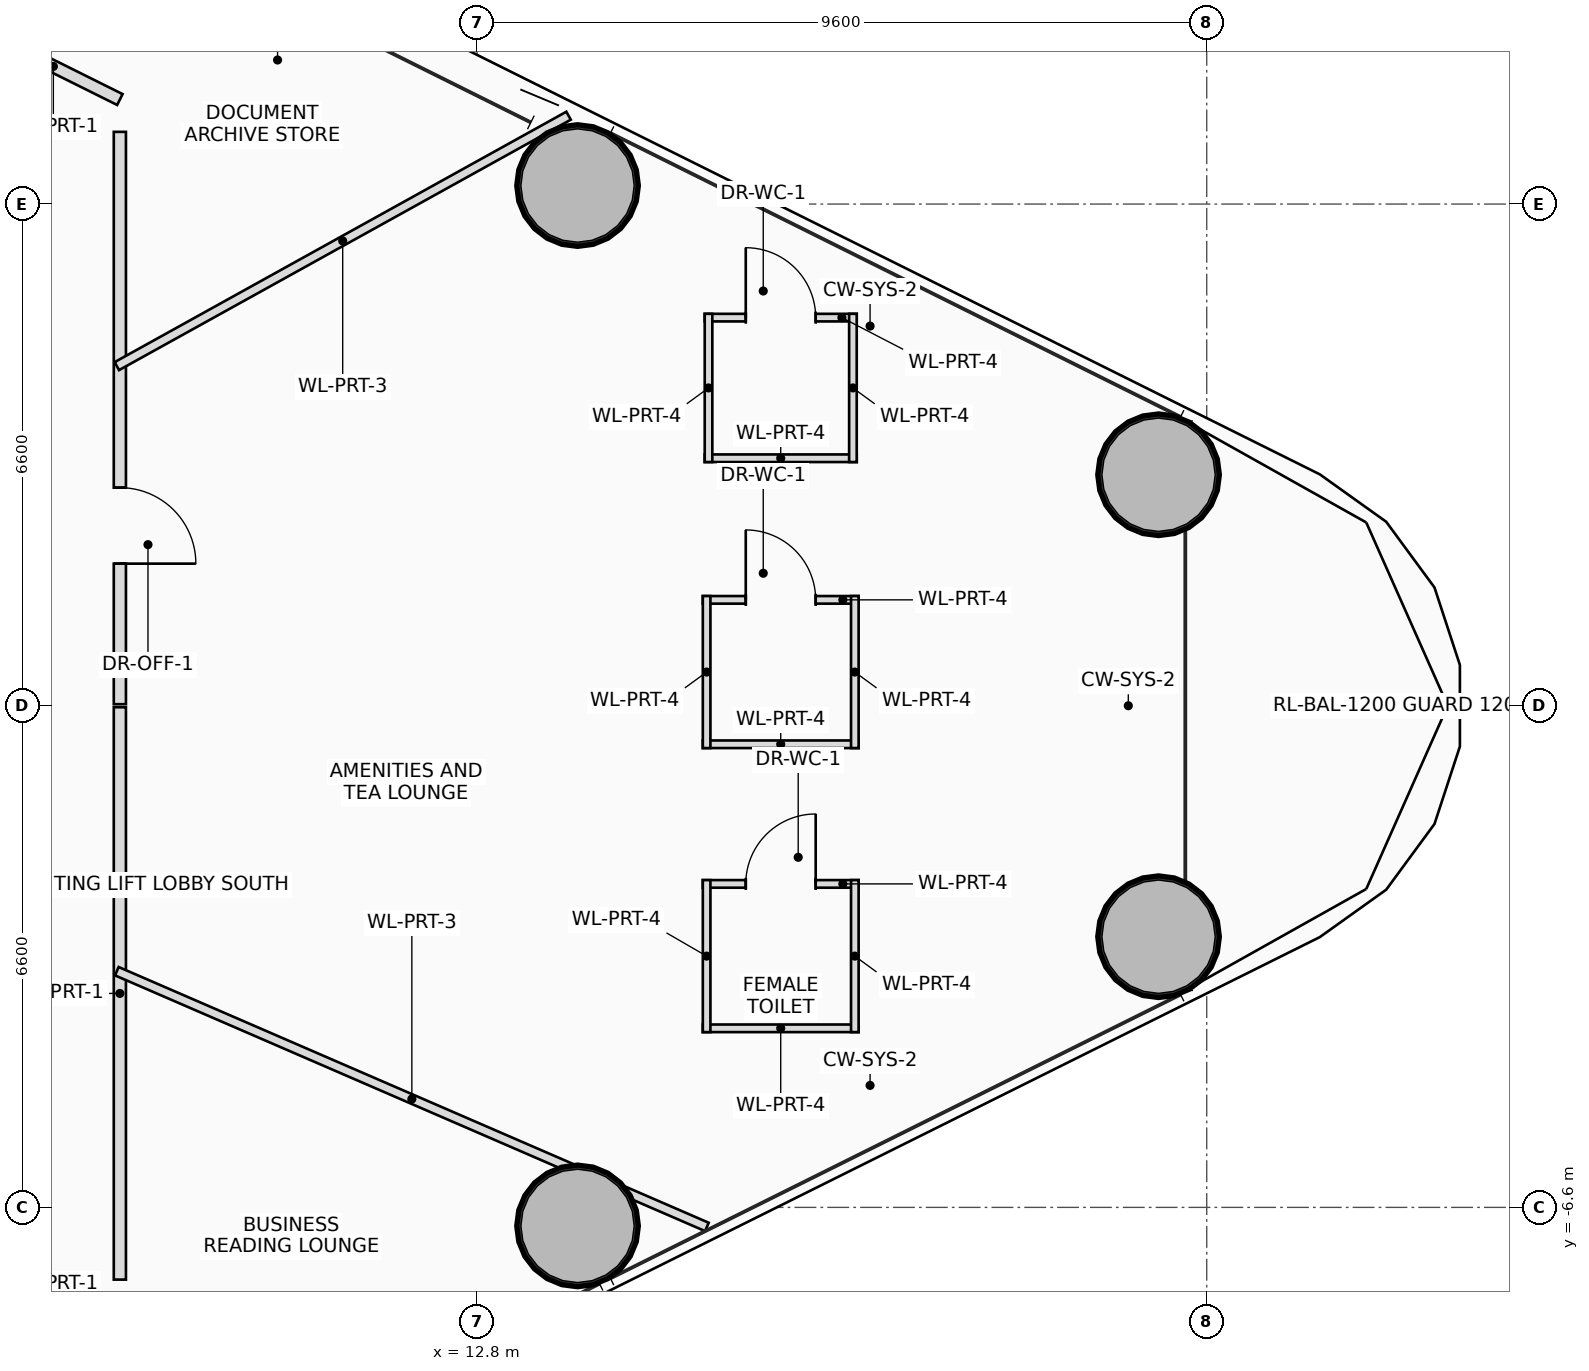
"""IFC4 building model, lengths in metres.
Left out: names, types, materials, properties, quantities, classifications, styles, units other than length and angle.
Written with IfcOpenShell. Run it as: python <this file> out.ifc"""

import sys

from ifc_helpers import new_model, si_unit, direction, frame, frame_2d, origin, origin_2d, place, context, subcontext, project, spatial, rectangle, hollow_circle, extrude, source, transform, mapped, element, fill, save


model = new_model("IFC4")
c1 = context("Model", 3, precision=1e-05, world=origin(), true_north=direction((0.0, 1.0)))
c2 = subcontext(c1, "Body", "Model", "MODEL_VIEW")
j1 = project(units=[si_unit("LENGTHUNIT", "METRE"), si_unit("PLANEANGLEUNIT", "RADIAN")], contexts=[c1])
p1 = place(None, origin())
s1 = spatial("IfcSite", under=j1, at=p1, CompositionType="ELEMENT")
p2 = place(p1, origin())
s2 = spatial("IfcBuilding", under=s1, at=p2, CompositionType="ELEMENT")
p3 = place(p2, frame((0.0, 0.0, 38.6)))
s3 = spatial("IfcBuildingStorey", under=s2, at=p3, CompositionType="ELEMENT", Elevation=38.6)
m1 = source(origin(), c2, "Body", "SweptSolid", [
    extrude(hollow_circle(Radius=0.8, WallThickness=0.055, at=origin_2d()), origin(), (0.0, 0.0, 1.0), 3.7),
])
for number, where, z_axis, x_axis in (
    (1, (14.122, -6.844, 0.0), (0.0, 0.0, 1.0), (1.0, 0.0, 0.0)),
    (2, (21.766, -3.039, 0.0), (0.0, 0.0, 1.0), (1.0, 0.0, 0.0)),
    (3, (21.766, 3.039, 0.0), (0.0, 0.0, 1.0), (1.0, 0.0, 0.0)),
    (4, (14.122, 6.844, 0.0), (0.0, 0.0, 1.0), (1.0, 0.0, 0.0)),
):
    element("IfcColumn", number, at=place(p3, frame(where, z_axis=z_axis, x_axis=x_axis)), inside=s3, PredefinedType="COLUMN", context=c2, shape_type="MappedRepresentation", body=[
        mapped(m1, transform((0.0, 0.0, 0.0), scale=1.0)),
    ])
p4 = place(p3, frame((15.77, 1.393, 0.0), z_axis=(0.0, 0.0, 1.0), x_axis=(1.0, 0.0, 0.0)))
e5 = element("IfcWall", 5, at=p4, inside=s3, PredefinedType="PARTITIONING", context=c2, shape_type="SweptSolid", body=[
    extrude(rectangle(XDim=2.05, YDim=0.1, at=frame_2d((1.025, 0.0))), origin(), (0.0, 0.0, 1.0), 3.15),
])
p5 = place(p4, frame((0.565, 0.0, 0.0)))
e6 = element("IfcOpeningElement", 6, at=p5, cuts=e5, PredefinedType="OPENING", context=c2, shape_type="SweptSolid", body=[
    extrude(rectangle(XDim=0.92, YDim=2.1, at=frame_2d((0.46, 1.05))), frame((0.0, 0.06, 0.0), z_axis=(0.0, -1.0, 0.0), x_axis=(1.0, 0.0, 0.0)), (0.0, 0.0, 1.0), 0.12),
])
p6 = place(p3, frame((17.82, -0.507, 0.0), z_axis=(0.0, 0.0, 1.0), x_axis=(-1.0, 0.0, 0.0)))
e7 = element("IfcWall", 7, at=p6, inside=s3, PredefinedType="PARTITIONING", context=c2, shape_type="SweptSolid", body=[
    extrude(rectangle(XDim=2.05, YDim=0.1, at=frame_2d((1.025, 0.0))), origin(), (0.0, 0.0, 1.0), 3.15),
])
p7 = place(p3, frame((17.77, 1.443, 0.0), z_axis=(0.0, 0.0, 1.0), x_axis=(0.0, -1.0, 0.0)))
e8 = element("IfcWall", 8, at=p7, inside=s3, PredefinedType="PARTITIONING", context=c2, shape_type="SweptSolid", body=[
    extrude(rectangle(XDim=2.0, YDim=0.1, at=frame_2d((1.0, 0.0))), origin(), (0.0, 0.0, 1.0), 3.15),
])
p8 = place(p3, frame((15.82, -0.557, 0.0), z_axis=(0.0, 0.0, 1.0), x_axis=(0.0, 1.0, 0.0)))
e9 = element("IfcWall", 9, at=p8, inside=s3, PredefinedType="PARTITIONING", context=c2, shape_type="SweptSolid", body=[
    extrude(rectangle(XDim=2.0, YDim=0.1, at=frame_2d((1.0, 0.0))), origin(), (0.0, 0.0, 1.0), 3.495),
])
p9 = place(p3, frame((15.77, -2.344, 0.0), z_axis=(0.0, 0.0, 1.0), x_axis=(1.0, 0.0, 0.0)))
e10 = element("IfcWall", 10, at=p9, inside=s3, PredefinedType="PARTITIONING", context=c2, shape_type="SweptSolid", body=[
    extrude(rectangle(XDim=2.05, YDim=0.1, at=frame_2d((1.025, 0.0))), origin(), (0.0, 0.0, 1.0), 3.15),
])
p10 = place(p9, frame((0.565, 0.0, 0.0)))
e11 = element("IfcOpeningElement", 11, at=p10, cuts=e10, PredefinedType="OPENING", context=c2, shape_type="SweptSolid", body=[
    extrude(rectangle(XDim=0.92, YDim=2.1, at=frame_2d((0.46, 1.05))), frame((0.0, 0.06, 0.0), z_axis=(0.0, -1.0, 0.0), x_axis=(1.0, 0.0, 0.0)), (0.0, 0.0, 1.0), 0.12),
])
p11 = place(p3, frame((17.82, -4.244, 0.0), z_axis=(0.0, 0.0, 1.0), x_axis=(-1.0, 0.0, 0.0)))
e12 = element("IfcWall", 12, at=p11, inside=s3, PredefinedType="PARTITIONING", context=c2, shape_type="SweptSolid", body=[
    extrude(rectangle(XDim=2.05, YDim=0.1, at=frame_2d((1.025, 0.0))), origin(), (0.0, 0.0, 1.0), 3.495),
])
for number, where, z_axis, x_axis in (
    (13, (17.77, -2.294, 0.0), (0.0, 0.0, 1.0), (0.0, -1.0, 0.0)),
    (14, (15.82, -4.294, 0.0), (0.0, 0.0, 1.0), (0.0, 1.0, 0.0)),
):
    element("IfcWall", number, at=place(p3, frame(where, z_axis=z_axis, x_axis=x_axis)), inside=s3, PredefinedType="PARTITIONING", context=c2, shape_type="SweptSolid", body=[
        extrude(rectangle(XDim=2.0, YDim=0.1, at=frame_2d((1.0, 0.0))), origin(), (0.0, 0.0, 1.0), 2.8),
    ])
p12 = place(p3, frame((15.795, 5.106, 0.0), z_axis=(0.0, 0.0, 1.0), x_axis=(1.0, 0.0, 0.0)))
e15 = element("IfcWall", 15, at=p12, inside=s3, PredefinedType="PARTITIONING", context=c2, shape_type="SweptSolid", body=[
    extrude(rectangle(XDim=2.0, YDim=0.1, at=frame_2d((1.0, 0.0))), origin(), (0.0, 0.0, 1.0), 2.96),
])
p13 = place(p12, frame((0.54, 0.0, 0.0)))
e16 = element("IfcOpeningElement", 16, at=p13, cuts=e15, PredefinedType="OPENING", context=c2, shape_type="SweptSolid", body=[
    extrude(rectangle(XDim=0.92, YDim=2.1, at=frame_2d((0.46, 1.05))), frame((0.0, 0.06, 0.0), z_axis=(0.0, -1.0, 0.0), x_axis=(1.0, 0.0, 0.0)), (0.0, 0.0, 1.0), 0.12),
])
p14 = place(p3, frame((17.795, 3.256, 0.0), z_axis=(0.0, 0.0, 1.0), x_axis=(-1.0, 0.0, 0.0)))
e17 = element("IfcWall", 17, at=p14, inside=s3, PredefinedType="PARTITIONING", context=c2, shape_type="SweptSolid", body=[
    extrude(rectangle(XDim=2.0, YDim=0.1, at=frame_2d((1.0, 0.0))), origin(), (0.0, 0.0, 1.0), 3.15),
])
for number, where, z_axis, x_axis in (
    (18, (17.745, 5.156, 0.0), (0.0, 0.0, 1.0), (0.0, -1.0, 0.0)),
    (19, (15.845, 3.206, 0.0), (0.0, 0.0, 1.0), (0.0, 1.0, 0.0)),
):
    element("IfcWall", number, at=place(p3, frame(where, z_axis=z_axis, x_axis=x_axis)), inside=s3, PredefinedType="PARTITIONING", context=c2, shape_type="SweptSolid", body=[
        extrude(rectangle(XDim=1.95, YDim=0.1, at=frame_2d((0.975, 0.0))), origin(), (0.0, 0.0, 1.0), 2.8),
    ])
p15 = place(p3, frame((6.35, 8.846, 0.0), z_axis=(0.0, 0.0, 1.0), x_axis=(0.89527489017, -0.445514164793, 0.0)))
e20 = element("IfcWall", 20, at=p15, inside=s3, PredefinedType="PARTITIONING", context=c2, shape_type="SweptSolid", body=[
    extrude(rectangle(XDim=1.955, YDim=0.16, at=frame_2d((0.977, 0.0))), origin(), (0.0, 0.0, 1.0), 2.8),
])
p16 = place(p3, frame((8.1, 7.55, 0.0), z_axis=(0.0, 0.0, 1.0), x_axis=(0.0, -1.0, 0.0)))
e21 = element("IfcWall", 21, at=p16, inside=s3, PredefinedType="PARTITIONING", context=c2, shape_type="SweptSolid", body=[
    extrude(rectangle(XDim=7.53, YDim=0.16, at=frame_2d((3.765, 0.0))), origin(), (0.0, 0.0, 1.0), 2.8),
])
p17 = place(p16, frame((4.681, 0.0, 0.0)))
e22 = element("IfcOpeningElement", 22, at=p17, cuts=e21, PredefinedType="OPENING", context=c2, shape_type="SweptSolid", body=[
    extrude(rectangle(XDim=1.0, YDim=2.25, at=frame_2d((0.5, 1.125))), frame((0.0, 0.09, 0.0), z_axis=(0.0, -1.0, 0.0), x_axis=(1.0, 0.0, 0.0)), (0.0, 0.0, 1.0), 0.18),
])
p18 = place(p3, frame((8.1, -0.02, 0.0), z_axis=(0.0, 0.0, 1.0), x_axis=(0.0, -1.0, 0.0)))
e23 = element("IfcWall", 23, at=p18, inside=s3, PredefinedType="PARTITIONING", context=c2, shape_type="SweptSolid", body=[
    extrude(rectangle(XDim=7.53, YDim=0.16, at=frame_2d((3.765, 0.0))), origin(), (0.0, 0.0, 1.0), 2.8),
])
p19 = place(p3, frame((8.06, 4.468, 0.0), z_axis=(0.0, 0.0, 1.0), x_axis=(0.874622878111, 0.484803899618, 0.0)))
e24 = element("IfcWall", 24, at=p19, inside=s3, PredefinedType="PARTITIONING", context=c2, shape_type="SweptSolid", body=[
    extrude(rectangle(XDim=6.796, YDim=0.12, at=frame_2d((3.398, 0.0))), origin(), (0.0, 0.0, 1.0), 2.8),
])
p20 = place(p3, frame((8.06, -3.493, 0.0), z_axis=(0.0, 0.0, 1.0), x_axis=(0.917561590562, -0.397593671385, 0.0)))
e25 = element("IfcWall", 25, at=p20, inside=s3, PredefinedType="PARTITIONING", context=c2, shape_type="SweptSolid", body=[
    extrude(rectangle(XDim=8.461, YDim=0.12, at=frame_2d((4.23, 0.0))), origin(), (0.0, 0.0, 1.0), 2.8),
])
p21 = place(p5, origin())
e26 = element("IfcDoor", 26, at=p21, inside=s3, OperationType="SINGLE_SWING_LEFT", PredefinedType="DOOR", context=c2, shape_type="SweptSolid", body=[
    extrude(rectangle(XDim=0.92, YDim=2.1, at=frame_2d((0.46, 1.05))), frame((0.0, 0.025, 0.0), z_axis=(0.0, -1.0, 0.0), x_axis=(1.0, 0.0, 0.0)), (0.0, 0.0, 1.0), 0.05),
])
fill(e6, e26)
p22 = place(p10, origin())
e27 = element("IfcDoor", 27, at=p22, inside=s3, OperationType="SINGLE_SWING_RIGHT", PredefinedType="DOOR", context=c2, shape_type="SweptSolid", body=[
    extrude(rectangle(XDim=0.92, YDim=2.1, at=frame_2d((0.46, 1.05))), frame((0.0, 0.025, 0.0), z_axis=(0.0, -1.0, 0.0), x_axis=(1.0, 0.0, 0.0)), (0.0, 0.0, 1.0), 0.05),
])
fill(e11, e27)
p23 = place(p13, origin())
e28 = element("IfcDoor", 28, at=p23, inside=s3, OperationType="SINGLE_SWING_LEFT", PredefinedType="DOOR", context=c2, shape_type="SweptSolid", body=[
    extrude(rectangle(XDim=0.92, YDim=2.1, at=frame_2d((0.46, 1.05))), frame((0.0, 0.025, 0.0), z_axis=(0.0, -1.0, 0.0), x_axis=(1.0, 0.0, 0.0)), (0.0, 0.0, 1.0), 0.05),
])
fill(e16, e28)
p24 = place(p17, origin())
e29 = element("IfcDoor", 29, at=p24, inside=s3, OperationType="SINGLE_SWING_RIGHT", PredefinedType="DOOR", context=c2, shape_type="SweptSolid", body=[
    extrude(rectangle(XDim=1.0, YDim=2.25, at=frame_2d((0.5, 1.125))), frame((0.0, 0.025, 0.0), z_axis=(0.0, -1.0, 0.0), x_axis=(1.0, 0.0, 0.0)), (0.0, 0.0, 1.0), 0.05),
])
fill(e22, e29)
save(model, sys.argv[1])
